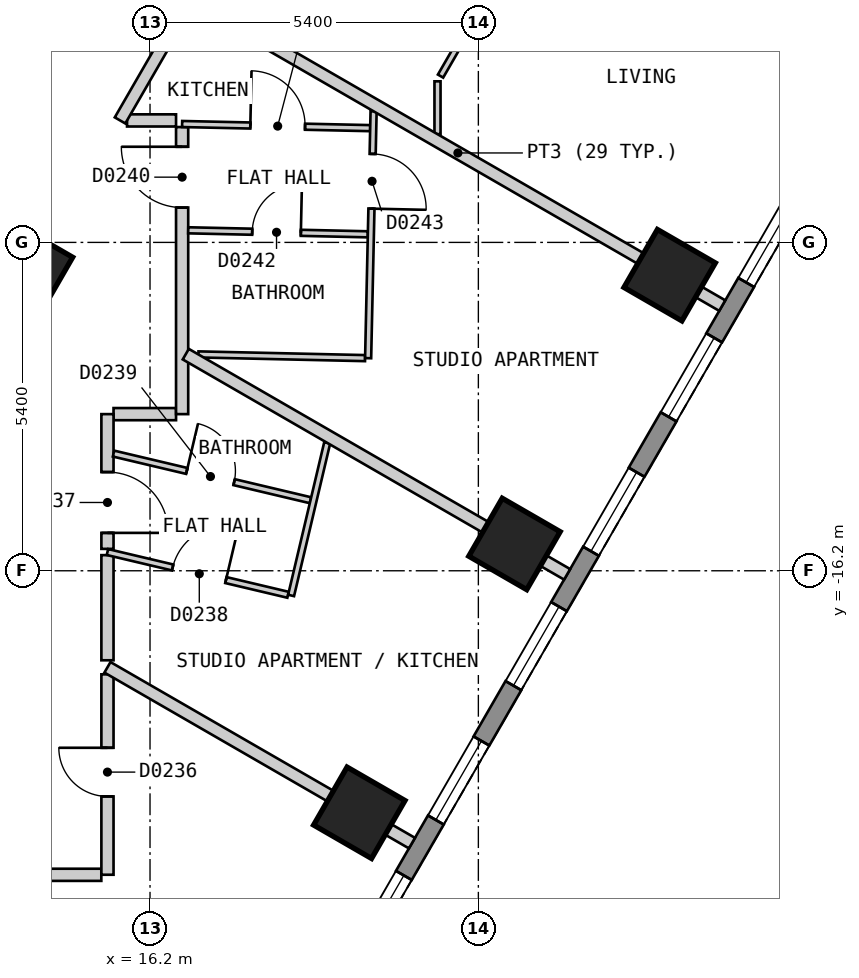
"""IFC4 building model, lengths in metres.
Left out: names, types, materials, properties, quantities, classifications, styles, units other than length and angle.
Written with IfcOpenShell. Run it as: python <this file> out.ifc"""

import sys

from ifc_helpers import new_model, si_unit, direction, frame, frame_2d, origin, origin_2d, place, context, subcontext, project, spatial, polyline, rectangle, outline, extrude, element, fill, save


model = new_model("IFC4")
c1 = context("Model", 3, precision=1e-05, world=origin(), true_north=direction((0.0, 1.0)))
c2 = subcontext(c1, "Body", "Model", "MODEL_VIEW")
j1 = project(units=[si_unit("LENGTHUNIT", "METRE"), si_unit("PLANEANGLEUNIT", "RADIAN")], contexts=[c1])
p1 = place(None, origin())
s1 = spatial("IfcSite", under=j1, at=p1, CompositionType="ELEMENT")
p2 = place(p1, origin())
s2 = spatial("IfcBuilding", under=s1, at=p2, CompositionType="ELEMENT")
p3 = place(p2, frame((0.0, 0.0, 47.4)))
s3 = spatial("IfcBuildingStorey", under=s2, at=p3, CompositionType="ELEMENT", Elevation=47.4)
for number, where, z_axis, x_axis in (
    (1, (19.642, -20.18, 0.0), (0.0, 0.0, 1.0), (0.5, 0.866, 0.0)),
    (2, (22.194, -15.759, 0.0), (0.0, 0.0, 1.0), (0.5, 0.866, 0.0)),
    (3, (24.746, -11.339, 0.0), (0.0, 0.0, 1.0), (0.5, 0.866, 0.0)),
):
    element("IfcColumn", number, at=place(p3, frame(where, z_axis=z_axis, x_axis=x_axis)), inside=s3, PredefinedType="COLUMN", context=c2, shape_type="SweptSolid", body=[
        extrude(rectangle(XDim=1.1, YDim=1.1, at=origin_2d()), origin(), (0.0, 0.0, 1.0), 3.0),
    ])
p4 = place(p3, frame((14.313, -11.209, 0.0), z_axis=(0.0, 0.0, 1.0), x_axis=(0.499984884929, 0.866034130299, 0.0)))
e4 = element("IfcColumn", 4, at=p4, inside=s3, PredefinedType="COLUMN", context=c2, shape_type="SweptSolid", body=[
    extrude(rectangle(XDim=0.9, YDim=0.9, at=origin_2d()), origin(), (0.0, 0.0, 1.0), 3.0),
])
p5 = place(p3, frame((17.71, -25.825, 0.0), z_axis=(0.0, 0.0, 1.0), x_axis=(0.500001938803, 0.866024284413, 0.0)))
e5 = element("IfcWall", 5, at=p5, inside=s3, PredefinedType="SOLIDWALL", context=c2, shape_type="SweptSolid", body=[
    extrude(outline(polyline([(0.0, -0.15), (27.02, -0.15), (26.94, 0.15), (0.08, 0.15), (0.0, -0.15)])), origin(), (0.0, 0.0, 1.0), 2.7),
])
p6 = place(p5, frame((1.277, 0.0, 0.15)))
e6 = element("IfcOpeningElement", 6, at=p6, cuts=e5, PredefinedType="OPENING", context=c2, shape_type="SweptSolid", body=[
    extrude(rectangle(XDim=1.5, YDim=2.1, at=frame_2d((0.75, 1.05))), frame((0.0, 0.16, 0.0), z_axis=(0.0, -1.0, 0.0), x_axis=(1.0, 0.0, 0.0)), (0.0, 0.0, 1.0), 0.32),
])
p7 = place(p5, frame((3.829, 0.0, 0.15)))
e7 = element("IfcOpeningElement", 7, at=p7, cuts=e5, PredefinedType="OPENING", context=c2, shape_type="SweptSolid", body=[
    extrude(rectangle(XDim=1.5, YDim=2.1, at=frame_2d((0.75, 1.05))), frame((0.0, 0.16, 0.0), z_axis=(0.0, -1.0, 0.0), x_axis=(1.0, 0.0, 0.0)), (0.0, 0.0, 1.0), 0.32),
])
p8 = place(p5, frame((6.382, 0.0, 0.15)))
e8 = element("IfcOpeningElement", 8, at=p8, cuts=e5, PredefinedType="OPENING", context=c2, shape_type="SweptSolid", body=[
    extrude(rectangle(XDim=1.5, YDim=2.1, at=frame_2d((0.75, 1.05))), frame((0.0, 0.16, 0.0), z_axis=(0.0, -1.0, 0.0), x_axis=(1.0, 0.0, 0.0)), (0.0, 0.0, 1.0), 0.32),
])
p9 = place(p5, frame((8.933, 0.0, 0.15)))
e9 = element("IfcOpeningElement", 9, at=p9, cuts=e5, PredefinedType="OPENING", context=c2, shape_type="SweptSolid", body=[
    extrude(rectangle(XDim=1.5, YDim=2.1, at=frame_2d((0.75, 1.05))), frame((0.0, 0.16, 0.0), z_axis=(0.0, -1.0, 0.0), x_axis=(1.0, 0.0, 0.0)), (0.0, 0.0, 1.0), 0.32),
])
p10 = place(p5, frame((11.485, 0.0, 0.15)))
e10 = element("IfcOpeningElement", 10, at=p10, cuts=e5, PredefinedType="OPENING", context=c2, shape_type="SweptSolid", body=[
    extrude(rectangle(XDim=1.5, YDim=2.1, at=frame_2d((0.75, 1.05))), frame((0.0, 0.16, 0.0), z_axis=(0.0, -1.0, 0.0), x_axis=(1.0, 0.0, 0.0)), (0.0, 0.0, 1.0), 0.32),
])
p11 = place(p5, frame((14.037, 0.0, 0.15)))
e11 = element("IfcOpeningElement", 11, at=p11, cuts=e5, PredefinedType="OPENING", context=c2, shape_type="SweptSolid", body=[
    extrude(rectangle(XDim=1.5, YDim=2.1, at=frame_2d((0.75, 1.05))), frame((0.0, 0.16, 0.0), z_axis=(0.0, -1.0, 0.0), x_axis=(1.0, 0.0, 0.0)), (0.0, 0.0, 1.0), 0.32),
])
p12 = place(p5, frame((16.589, 0.0, 0.15)))
e12 = element("IfcOpeningElement", 12, at=p12, cuts=e5, PredefinedType="OPENING", context=c2, shape_type="SweptSolid", body=[
    extrude(rectangle(XDim=1.5, YDim=2.1, at=frame_2d((0.75, 1.05))), frame((0.0, 0.16, 0.0), z_axis=(0.0, -1.0, 0.0), x_axis=(1.0, 0.0, 0.0)), (0.0, 0.0, 1.0), 0.32),
])
p13 = place(p5, frame((19.141, 0.0, 0.15)))
e13 = element("IfcOpeningElement", 13, at=p13, cuts=e5, PredefinedType="OPENING", context=c2, shape_type="SweptSolid", body=[
    extrude(rectangle(XDim=1.5, YDim=2.1, at=frame_2d((0.75, 1.05))), frame((0.0, 0.16, 0.0), z_axis=(0.0, -1.0, 0.0), x_axis=(1.0, 0.0, 0.0)), (0.0, 0.0, 1.0), 0.32),
])
p14 = place(p5, frame((21.693, 0.0, 0.15)))
e14 = element("IfcOpeningElement", 14, at=p14, cuts=e5, PredefinedType="OPENING", context=c2, shape_type="SweptSolid", body=[
    extrude(rectangle(XDim=1.5, YDim=2.1, at=frame_2d((0.75, 1.05))), frame((0.0, 0.16, 0.0), z_axis=(0.0, -1.0, 0.0), x_axis=(1.0, 0.0, 0.0)), (0.0, 0.0, 1.0), 0.32),
])
p15 = place(p5, frame((24.244, 0.0, 0.15)))
e15 = element("IfcOpeningElement", 15, at=p15, cuts=e5, PredefinedType="OPENING", context=c2, shape_type="SweptSolid", body=[
    extrude(rectangle(XDim=1.5, YDim=2.1, at=frame_2d((0.75, 1.05))), frame((0.0, 0.16, 0.0), z_axis=(0.0, -1.0, 0.0), x_axis=(1.0, 0.0, 0.0)), (0.0, 0.0, 1.0), 0.32),
])
p16 = place(p3, frame((15.5, -15.943, 0.0), z_axis=(0.0, 0.0, 1.0), x_axis=(0.0, -1.0, 0.0)))
e16 = element("IfcWall", 16, at=p16, inside=s3, PredefinedType="PARTITIONING", context=c2, shape_type="SweptSolid", body=[
    extrude(rectangle(XDim=1.729, YDim=0.2, at=frame_2d((0.865, 0.0))), origin(), (0.0, 0.0, 1.0), 2.7),
])
p17 = place(p3, frame((15.822, -8.794, 0.0), z_axis=(0.0, 0.0, 1.0), x_axis=(1.0, 0.0, 0.0)))
e17 = element("IfcWall", 17, at=p17, inside=s3, PredefinedType="PARTITIONING", context=c2, shape_type="SweptSolid", body=[
    extrude(rectangle(XDim=0.806, YDim=0.2, at=frame_2d((0.403, 0.0))), origin(), (0.0, 0.0, 1.0), 2.7),
])
p18 = place(p3, frame((15.6, -13.624, 0.0), z_axis=(0.0, 0.0, 1.0), x_axis=(1.0, 0.0, 0.0)))
e18 = element("IfcWall", 18, at=p18, inside=s3, PredefinedType="PARTITIONING", context=c2, shape_type="SweptSolid", body=[
    extrude(rectangle(XDim=1.028, YDim=0.2, at=frame_2d((0.514, 0.0))), origin(), (0.0, 0.0, 1.0), 2.7),
])
p19 = place(p3, frame((-15.499, -21.2, 0.0), z_axis=(0.0, 0.0, 1.0), x_axis=(1.0, 0.0, 0.0)))
e19 = element("IfcWall", 19, at=p19, inside=s3, PredefinedType="PARTITIONING", context=c2, shape_type="SweptSolid", body=[
    extrude(rectangle(XDim=30.898, YDim=0.2, at=frame_2d((15.449, 0.0))), origin(), (0.0, 0.0, 1.0), 2.7),
])
p20 = place(p19, frame((5.084, 0.0, 0.0)))
e20 = element("IfcOpeningElement", 20, at=p20, cuts=e19, PredefinedType="OPENING", context=c2, shape_type="SweptSolid", body=[
    extrude(rectangle(XDim=0.9, YDim=2.1, at=frame_2d((0.45, 1.05))), frame((0.0, 0.11, 0.0), z_axis=(0.0, -1.0, 0.0), x_axis=(1.0, 0.0, 0.0)), (0.0, 0.0, 1.0), 0.22),
])
p21 = place(p19, frame((15.0, 0.0, 0.0)))
e21 = element("IfcOpeningElement", 21, at=p21, cuts=e19, PredefinedType="OPENING", context=c2, shape_type="SweptSolid", body=[
    extrude(rectangle(XDim=1.0, YDim=2.1, at=frame_2d((0.5, 1.05))), frame((0.0, 0.11, 0.0), z_axis=(0.0, -1.0, 0.0), x_axis=(1.0, 0.0, 0.0)), (0.0, 0.0, 1.0), 0.22),
])
p22 = place(p19, frame((25.015, 0.0, 0.0)))
e22 = element("IfcOpeningElement", 22, at=p22, cuts=e19, PredefinedType="OPENING", context=c2, shape_type="SweptSolid", body=[
    extrude(rectangle(XDim=0.9, YDim=2.1, at=frame_2d((0.45, 1.05))), frame((0.0, 0.11, 0.0), z_axis=(0.0, -1.0, 0.0), x_axis=(1.0, 0.0, 0.0)), (0.0, 0.0, 1.0), 0.22),
])
p23 = place(p3, frame((15.707, -8.794, 0.0), z_axis=(0.0, 0.0, 1.0), x_axis=(0.500040469623, 0.866002037376, 0.0)))
e23 = element("IfcWall", 23, at=p23, inside=s3, PredefinedType="PARTITIONING", context=c2, shape_type="SweptSolid", body=[
    extrude(rectangle(XDim=2.281, YDim=0.2, at=frame_2d((1.141, 0.0))), origin(), (0.0, 0.0, 1.0), 2.7),
])
p24 = place(p3, frame((15.5, -21.199, 0.0), z_axis=(0.0, 0.0, 1.0), x_axis=(0.0, 1.0, 0.0)))
e24 = element("IfcWall", 24, at=p24, inside=s3, PredefinedType="PARTITIONING", context=c2, shape_type="SweptSolid", body=[
    extrude(rectangle(XDim=3.296, YDim=0.2, at=frame_2d((1.648, 0.0))), origin(), (0.0, 0.0, 1.0), 2.7),
])
p25 = place(p24, frame((1.288, 0.0, 0.0)))
e25 = element("IfcOpeningElement", 25, at=p25, cuts=e24, PredefinedType="OPENING", context=c2, shape_type="SweptSolid", body=[
    extrude(rectangle(XDim=0.8, YDim=2.1, at=frame_2d((0.4, 1.05))), frame((0.0, 0.11, 0.0), z_axis=(0.0, -1.0, 0.0), x_axis=(1.0, 0.0, 0.0)), (0.0, 0.0, 1.0), 0.22),
])
p26 = place(p3, frame((15.5, -15.84, 0.0), z_axis=(0.0, 0.0, 1.0), x_axis=(0.0, 1.0, 0.0)))
e26 = element("IfcWall", 26, at=p26, inside=s3, PredefinedType="PARTITIONING", context=c2, shape_type="SweptSolid", body=[
    extrude(rectangle(XDim=2.216, YDim=0.2, at=frame_2d((1.108, 0.0))), origin(), (0.0, 0.0, 1.0), 2.7),
])
p27 = place(p26, frame((0.263, 0.0, 0.0)))
e27 = element("IfcOpeningElement", 27, at=p27, cuts=e26, PredefinedType="OPENING", context=c2, shape_type="SweptSolid", body=[
    extrude(rectangle(XDim=1.0, YDim=2.1, at=frame_2d((0.5, 1.05))), frame((0.0, 0.11, 0.0), z_axis=(0.0, -1.0, 0.0), x_axis=(1.0, 0.0, 0.0)), (0.0, 0.0, 1.0), 0.22),
])
p28 = place(p3, frame((16.728, -13.624, 0.0), z_axis=(0.0, 0.0, 1.0), x_axis=(0.0, 1.0, 0.0)))
e28 = element("IfcWall", 28, at=p28, inside=s3, PredefinedType="PARTITIONING", context=c2, shape_type="SweptSolid", body=[
    extrude(rectangle(XDim=4.721, YDim=0.2, at=frame_2d((2.36, 0.0))), origin(), (0.0, 0.0, 1.0), 2.7),
])
p29 = place(p28, frame((3.397, 0.0, 0.0)))
e29 = element("IfcOpeningElement", 29, at=p29, cuts=e28, PredefinedType="OPENING", context=c2, shape_type="SweptSolid", body=[
    extrude(rectangle(XDim=1.0, YDim=2.1, at=frame_2d((0.5, 1.05))), frame((0.0, 0.11, 0.0), z_axis=(0.0, -1.0, 0.0), x_axis=(1.0, 0.0, 0.0)), (0.0, 0.0, 1.0), 0.22),
])
p30 = place(p3, frame((15.6, -14.273, 0.0), z_axis=(0.0, 0.0, 1.0), x_axis=(0.973083317443, -0.230453590368, 0.0)))
e30 = element("IfcWall", 30, at=p30, inside=s3, PredefinedType="PARTITIONING", context=c2, shape_type="SweptSolid", body=[
    extrude(rectangle(XDim=3.329, YDim=0.1, at=frame_2d((1.664, 0.0))), origin(), (0.0, 0.0, 1.0), 2.7),
])
p31 = place(p30, frame((1.238, 0.0, 0.0)))
e31 = element("IfcOpeningElement", 31, at=p31, cuts=e30, PredefinedType="OPENING", context=c2, shape_type="SweptSolid", body=[
    extrude(rectangle(XDim=0.8, YDim=2.1, at=frame_2d((0.4, 1.05))), frame((0.0, 0.06, 0.0), z_axis=(0.0, -1.0, 0.0), x_axis=(1.0, 0.0, 0.0)), (0.0, 0.0, 1.0), 0.12),
])
p32 = place(p3, frame((15.5, -15.892, 0.0), z_axis=(0.0, 0.0, 1.0), x_axis=(0.973119457068, -0.230300938504, 0.0)))
e32 = element("IfcWall", 32, at=p32, inside=s3, PredefinedType="PARTITIONING", context=c2, shape_type="SweptSolid", body=[
    extrude(rectangle(XDim=3.052, YDim=0.1, at=frame_2d((1.526, 0.0))), origin(), (0.0, 0.0, 1.0), 2.7),
])
p33 = place(p32, frame((1.102, 0.0, 0.0)))
e33 = element("IfcOpeningElement", 33, at=p33, cuts=e32, PredefinedType="OPENING", context=c2, shape_type="SweptSolid", body=[
    extrude(rectangle(XDim=0.9, YDim=2.1, at=frame_2d((0.45, 1.05))), frame((0.0, 0.06, 0.0), z_axis=(0.0, -1.0, 0.0), x_axis=(1.0, 0.0, 0.0)), (0.0, 0.0, 1.0), 0.12),
])
p34 = place(p3, frame((16.728, -8.853, 0.0), z_axis=(0.0, 0.0, 1.0), x_axis=(0.999759332126, -0.021938045176, 0.0)))
e34 = element("IfcWall", 34, at=p34, inside=s3, PredefinedType="PARTITIONING", context=c2, shape_type="SweptSolid", body=[
    extrude(rectangle(XDim=3.094, YDim=0.1, at=frame_2d((1.547, 0.0))), origin(), (0.0, 0.0, 1.0), 2.7),
])
p35 = place(p34, frame((1.122, 0.0, 0.0)))
e35 = element("IfcOpeningElement", 35, at=p35, cuts=e34, PredefinedType="OPENING", context=c2, shape_type="SweptSolid", body=[
    extrude(rectangle(XDim=0.9, YDim=2.1, at=frame_2d((0.45, 1.05))), frame((0.0, 0.06, 0.0), z_axis=(0.0, -1.0, 0.0), x_axis=(1.0, 0.0, 0.0)), (0.0, 0.0, 1.0), 0.12),
])
p36 = place(p3, frame((16.828, -10.601, 0.0), z_axis=(0.0, 0.0, 1.0), x_axis=(0.999751134527, -0.02230849639, 0.0)))
e36 = element("IfcWall", 36, at=p36, inside=s3, PredefinedType="PARTITIONING", context=c2, shape_type="SweptSolid", body=[
    extrude(rectangle(XDim=2.955, YDim=0.1, at=frame_2d((1.478, 0.0))), origin(), (0.0, 0.0, 1.0), 2.7),
])
p37 = place(p36, frame((1.053, 0.0, 0.0)))
e37 = element("IfcOpeningElement", 37, at=p37, cuts=e36, PredefinedType="OPENING", context=c2, shape_type="SweptSolid", body=[
    extrude(rectangle(XDim=0.8, YDim=2.1, at=frame_2d((0.4, 1.05))), frame((0.0, 0.06, 0.0), z_axis=(0.0, -1.0, 0.0), x_axis=(1.0, 0.0, 0.0)), (0.0, 0.0, 1.0), 0.12),
])
p38 = place(p3, frame((16.996, -12.642, 0.0), z_axis=(0.0, 0.0, 1.0), x_axis=(0.999754143854, -0.022173223641, 0.0)))
e38 = element("IfcWall", 38, at=p38, inside=s3, PredefinedType="PARTITIONING", context=c2, shape_type="SweptSolid", body=[
    extrude(rectangle(XDim=2.742, YDim=0.1, at=frame_2d((1.371, 0.0))), origin(), (0.0, 0.0, 1.0), 2.7),
])
p39 = place(p3, frame((20.978, -8.065, 0.0), z_axis=(0.0, 0.0, 1.0), x_axis=(0.499965068118, 0.866045570776, 0.0)))
e39 = element("IfcWall", 39, at=p39, inside=s3, PredefinedType="PARTITIONING", context=c2, shape_type="SweptSolid", body=[
    extrude(rectangle(XDim=4.152, YDim=0.1, at=frame_2d((2.076, 0.0))), origin(), (0.0, 0.0, 1.0), 2.7),
])
p40 = place(p39, frame((1.15, 0.0, 0.0)))
e40 = element("IfcOpeningElement", 40, at=p40, cuts=e39, PredefinedType="OPENING", context=c2, shape_type="SweptSolid", body=[
    extrude(rectangle(XDim=0.9, YDim=2.1, at=frame_2d((0.45, 1.05))), frame((0.0, 0.06, 0.0), z_axis=(0.0, -1.0, 0.0), x_axis=(1.0, 0.0, 0.0)), (0.0, 0.0, 1.0), 0.12),
])
p41 = place(p3, frame((18.52, -16.606, 0.0), z_axis=(0.0, 0.0, 1.0), x_axis=(0.230289488548, 0.973122166773, 0.0)))
e41 = element("IfcWall", 41, at=p41, inside=s3, PredefinedType="PARTITIONING", context=c2, shape_type="SweptSolid", body=[
    extrude(rectangle(XDim=2.579, YDim=0.1, at=frame_2d((1.29, 0.0))), origin(), (0.0, 0.0, 1.0), 2.7),
])
p42 = place(p3, frame((19.787, -12.704, 0.0), z_axis=(0.0, 0.0, 1.0), x_axis=(0.02212326712, 0.999755250575, 0.0)))
e42 = element("IfcWall", 42, at=p42, inside=s3, PredefinedType="PARTITIONING", context=c2, shape_type="SweptSolid", body=[
    extrude(rectangle(XDim=4.061, YDim=0.1, at=frame_2d((2.031, 0.0))), origin(), (0.0, 0.0, 1.0), 2.7),
])
p43 = place(p42, frame((2.46, 0.0, 0.0)))
e43 = element("IfcOpeningElement", 43, at=p43, cuts=e42, PredefinedType="OPENING", context=c2, shape_type="SweptSolid", body=[
    extrude(rectangle(XDim=0.9, YDim=2.1, at=frame_2d((0.45, 1.05))), frame((0.0, 0.06, 0.0), z_axis=(0.0, -1.0, 0.0), x_axis=(1.0, 0.0, 0.0)), (0.0, 0.0, 1.0), 0.12),
])
p44 = place(p3, frame((20.928, -9.02, 0.0), z_axis=(0.0, 0.0, 1.0), x_axis=(0.0, 1.0, 0.0)))
e44 = element("IfcWall", 44, at=p44, inside=s3, PredefinedType="PARTITIONING", context=c2, shape_type="SweptSolid", body=[
    extrude(rectangle(XDim=0.869, YDim=0.1, at=frame_2d((0.435, 0.0))), origin(), (0.0, 0.0, 1.0), 2.7),
])
p45 = place(p3, frame((12.297, -21.3, 0.0), z_axis=(0.0, 0.0, 1.0), x_axis=(0.500056399578, -0.865992839024, 0.0)))
e45 = element("IfcWall", 45, at=p45, inside=s3, PredefinedType="PARTITIONING", context=c2, shape_type="SweptSolid", body=[
    extrude(rectangle(XDim=6.455, YDim=0.2, at=frame_2d((3.228, 0.0))), origin(), (0.0, 0.0, 1.0), 2.7),
])
p46 = place(p3, frame((15.5, -17.788, 0.0), z_axis=(0.0, 0.0, 1.0), x_axis=(0.866065366639, -0.499930775916, 0.0)))
e46 = element("IfcWall", 46, at=p46, inside=s3, PredefinedType="PARTITIONING", context=c2, shape_type="SweptSolid", body=[
    extrude(rectangle(XDim=5.782, YDim=0.2, at=frame_2d((2.891, 0.0))), origin(), (0.0, 0.0, 1.0), 2.7),
])
p47 = place(p3, frame((16.788, -12.638, 0.0), z_axis=(0.0, 0.0, 1.0), x_axis=(0.866027278279, -0.499996753267, 0.0)))
e47 = element("IfcWall", 47, at=p47, inside=s3, PredefinedType="PARTITIONING", context=c2, shape_type="SweptSolid", body=[
    extrude(rectangle(XDim=7.242, YDim=0.2, at=frame_2d((3.621, 0.0))), origin(), (0.0, 0.0, 1.0), 2.7),
])
p48 = place(p3, frame((16.916, -6.819, 0.0), z_axis=(0.0, 0.0, 1.0), x_axis=(0.866028876723, -0.499993984646, 0.0)))
e48 = element("IfcWall", 48, at=p48, inside=s3, PredefinedType="PARTITIONING", context=c2, shape_type="SweptSolid", body=[
    extrude(rectangle(XDim=10.04, YDim=0.2, at=frame_2d((5.02, 0.0))), origin(), (0.0, 0.0, 1.0), 2.7),
])
p49 = place(p7, origin())
e49 = element("IfcWindow", 49, at=p49, inside=s3, PartitioningType="SINGLE_PANEL", PredefinedType="WINDOW", context=c2, shape_type="SweptSolid", body=[
    extrude(rectangle(XDim=1.5, YDim=2.1, at=frame_2d((0.75, 1.05))), frame((0.0, 0.03, 0.0), z_axis=(0.0, -1.0, 0.0), x_axis=(1.0, 0.0, 0.0)), (0.0, 0.0, 1.0), 0.06),
])
fill(e7, e49)
p50 = place(p8, origin())
e50 = element("IfcWindow", 50, at=p50, inside=s3, PartitioningType="SINGLE_PANEL", PredefinedType="WINDOW", context=c2, shape_type="SweptSolid", body=[
    extrude(rectangle(XDim=1.5, YDim=2.1, at=frame_2d((0.75, 1.05))), frame((0.0, 0.03, 0.0), z_axis=(0.0, -1.0, 0.0), x_axis=(1.0, 0.0, 0.0)), (0.0, 0.0, 1.0), 0.06),
])
fill(e8, e50)
p51 = place(p9, origin())
e51 = element("IfcWindow", 51, at=p51, inside=s3, PartitioningType="SINGLE_PANEL", PredefinedType="WINDOW", context=c2, shape_type="SweptSolid", body=[
    extrude(rectangle(XDim=1.5, YDim=2.1, at=frame_2d((0.75, 1.05))), frame((0.0, 0.03, 0.0), z_axis=(0.0, -1.0, 0.0), x_axis=(1.0, 0.0, 0.0)), (0.0, 0.0, 1.0), 0.06),
])
fill(e9, e51)
p52 = place(p10, origin())
e52 = element("IfcWindow", 52, at=p52, inside=s3, PartitioningType="SINGLE_PANEL", PredefinedType="WINDOW", context=c2, shape_type="SweptSolid", body=[
    extrude(rectangle(XDim=1.5, YDim=2.1, at=frame_2d((0.75, 1.05))), frame((0.0, 0.03, 0.0), z_axis=(0.0, -1.0, 0.0), x_axis=(1.0, 0.0, 0.0)), (0.0, 0.0, 1.0), 0.06),
])
fill(e10, e52)
p53 = place(p11, origin())
e53 = element("IfcWindow", 53, at=p53, inside=s3, PartitioningType="SINGLE_PANEL", PredefinedType="WINDOW", context=c2, shape_type="SweptSolid", body=[
    extrude(rectangle(XDim=1.5, YDim=2.1, at=frame_2d((0.75, 1.05))), frame((0.0, 0.03, 0.0), z_axis=(0.0, -1.0, 0.0), x_axis=(1.0, 0.0, 0.0)), (0.0, 0.0, 1.0), 0.06),
])
fill(e11, e53)
p54 = place(p12, origin())
e54 = element("IfcWindow", 54, at=p54, inside=s3, PartitioningType="SINGLE_PANEL", PredefinedType="WINDOW", context=c2, shape_type="SweptSolid", body=[
    extrude(rectangle(XDim=1.5, YDim=2.1, at=frame_2d((0.75, 1.05))), frame((0.0, 0.03, 0.0), z_axis=(0.0, -1.0, 0.0), x_axis=(1.0, 0.0, 0.0)), (0.0, 0.0, 1.0), 0.06),
])
fill(e12, e54)
p55 = place(p25, origin())
e55 = element("IfcDoor", 55, at=p55, inside=s3, OperationType="SINGLE_SWING_RIGHT", PredefinedType="DOOR", context=c2, shape_type="SweptSolid", body=[
    extrude(rectangle(XDim=0.8, YDim=2.1, at=frame_2d((0.4, 1.05))), frame((0.0, 0.025, 0.0), z_axis=(0.0, -1.0, 0.0), x_axis=(1.0, 0.0, 0.0)), (0.0, 0.0, 1.0), 0.05),
])
fill(e25, e55)
p56 = place(p27, origin())
e56 = element("IfcDoor", 56, at=p56, inside=s3, OperationType="SINGLE_SWING_LEFT", PredefinedType="DOOR", context=c2, shape_type="SweptSolid", body=[
    extrude(rectangle(XDim=1.0, YDim=2.1, at=frame_2d((0.5, 1.05))), frame((0.0, 0.025, 0.0), z_axis=(0.0, -1.0, 0.0), x_axis=(1.0, 0.0, 0.0)), (0.0, 0.0, 1.0), 0.05),
])
fill(e27, e56)
p57 = place(p33, origin())
e57 = element("IfcDoor", 57, at=p57, inside=s3, OperationType="SINGLE_SWING_RIGHT", PredefinedType="DOOR", context=c2, shape_type="SweptSolid", body=[
    extrude(rectangle(XDim=0.9, YDim=2.1, at=frame_2d((0.45, 1.05))), frame((0.0, 0.025, 0.0), z_axis=(0.0, -1.0, 0.0), x_axis=(1.0, 0.0, 0.0)), (0.0, 0.0, 1.0), 0.05),
])
fill(e33, e57)
p58 = place(p31, origin())
e58 = element("IfcDoor", 58, at=p58, inside=s3, OperationType="SINGLE_SWING_LEFT", PredefinedType="DOOR", context=c2, shape_type="SweptSolid", body=[
    extrude(rectangle(XDim=0.8, YDim=2.1, at=frame_2d((0.4, 1.05))), frame((0.0, 0.025, 0.0), z_axis=(0.0, -1.0, 0.0), x_axis=(1.0, 0.0, 0.0)), (0.0, 0.0, 1.0), 0.05),
])
fill(e31, e58)
p59 = place(p29, origin())
e59 = element("IfcDoor", 59, at=p59, inside=s3, OperationType="SINGLE_SWING_RIGHT", PredefinedType="DOOR", context=c2, shape_type="SweptSolid", body=[
    extrude(rectangle(XDim=1.0, YDim=2.1, at=frame_2d((0.5, 1.05))), frame((0.0, 0.025, 0.0), z_axis=(0.0, -1.0, 0.0), x_axis=(1.0, 0.0, 0.0)), (0.0, 0.0, 1.0), 0.05),
])
fill(e29, e59)
p60 = place(p35, origin())
e60 = element("IfcDoor", 60, at=p60, inside=s3, OperationType="SINGLE_SWING_LEFT", PredefinedType="DOOR", context=c2, shape_type="SweptSolid", body=[
    extrude(rectangle(XDim=0.9, YDim=2.1, at=frame_2d((0.45, 1.05))), frame((0.0, 0.025, 0.0), z_axis=(0.0, -1.0, 0.0), x_axis=(1.0, 0.0, 0.0)), (0.0, 0.0, 1.0), 0.05),
])
fill(e35, e60)
p61 = place(p37, origin())
e61 = element("IfcDoor", 61, at=p61, inside=s3, OperationType="SINGLE_SWING_RIGHT", PredefinedType="DOOR", context=c2, shape_type="SweptSolid", body=[
    extrude(rectangle(XDim=0.8, YDim=2.1, at=frame_2d((0.4, 1.05))), frame((0.0, 0.025, 0.0), z_axis=(0.0, -1.0, 0.0), x_axis=(1.0, 0.0, 0.0)), (0.0, 0.0, 1.0), 0.05),
])
fill(e37, e61)
p62 = place(p43, origin())
e62 = element("IfcDoor", 62, at=p62, inside=s3, OperationType="SINGLE_SWING_LEFT", PredefinedType="DOOR", context=c2, shape_type="SweptSolid", body=[
    extrude(rectangle(XDim=0.9, YDim=2.1, at=frame_2d((0.45, 1.05))), frame((0.0, 0.025, 0.0), z_axis=(0.0, -1.0, 0.0), x_axis=(1.0, 0.0, 0.0)), (0.0, 0.0, 1.0), 0.05),
])
fill(e43, e62)
save(model, sys.argv[1])
